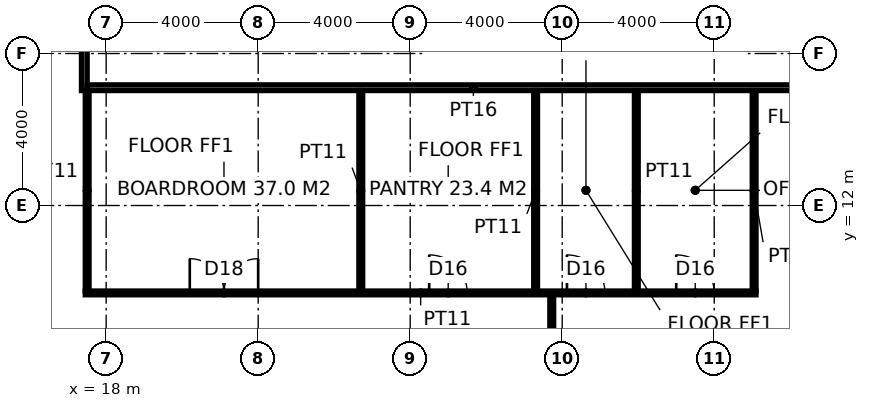
"""IFC4 building model, lengths in metres.
Left out: names, types, materials, properties, quantities, classifications, styles, units other than length and angle.
Written with IfcOpenShell. Run it as: python <this file> out.ifc"""

import sys

from ifc_helpers import new_model, si_unit, direction, frame, frame_2d, origin, place, context, subcontext, project, spatial, rectangle, extrude, element, fill, save


model = new_model("IFC4")
c1 = context("Model", 3, precision=1e-05, world=origin(), true_north=direction((0.0, 1.0)))
c2 = subcontext(c1, "Body", "Model", "MODEL_VIEW")
j1 = project(units=[si_unit("LENGTHUNIT", "METRE"), si_unit("PLANEANGLEUNIT", "RADIAN")], contexts=[c1])
p1 = place(None, origin())
s1 = spatial("IfcSite", under=j1, at=p1, CompositionType="ELEMENT")
p2 = place(p1, origin())
s2 = spatial("IfcBuilding", under=s1, at=p2, CompositionType="ELEMENT")
p3 = place(p2, frame((0.0, 0.0, 159.8)))
s3 = spatial("IfcBuildingStorey", under=s2, at=p3, CompositionType="ELEMENT", Elevation=159.8)
p4 = place(p3, frame((17.425, 15.025, 0.0), z_axis=(0.0, 0.0, 1.0), x_axis=(0.0, 1.0, 0.0)))
e1 = element("IfcWall", 1, at=p4, inside=s3, PredefinedType="PARTITIONING", context=c2, shape_type="SweptSolid", body=[
    extrude(rectangle(XDim=2.475, YDim=0.15, at=frame_2d((1.238, 0.0))), origin(), (0.0, 0.0, 1.0), 3.85),
])
p5 = place(p3, frame((17.5, 15.1, 0.0), z_axis=(0.0, 0.0, 1.0), x_axis=(1.0, 0.0, 0.0)))
e2 = element("IfcWall", 2, at=p5, inside=s3, PredefinedType="PARTITIONING", context=c2, shape_type="SweptSolid", body=[
    extrude(rectangle(XDim=20.325, YDim=0.15, at=frame_2d((10.163, 0.0))), origin(), (0.0, 0.0, 1.0), 3.85),
])
p6 = place(p3, frame((17.45, 9.7, 0.0), z_axis=(0.0, 0.0, 1.0), x_axis=(1.0, 0.0, 0.0)))
e3 = element("IfcWall", 3, at=p6, inside=s3, PredefinedType="PARTITIONING", context=c2, shape_type="SweptSolid", body=[
    extrude(rectangle(XDim=17.65, YDim=0.1, at=frame_2d((8.825, 0.0))), origin(), (0.0, 0.0, 1.0), 3.85),
])
p7 = place(p6, frame((2.75, 0.0, 0.0)))
e4 = element("IfcOpeningElement", 4, at=p7, cuts=e3, PredefinedType="OPENING", context=c2, shape_type="SweptSolid", body=[
    extrude(rectangle(XDim=1.8, YDim=2.4, at=frame_2d((0.9, 1.2))), frame((0.0, 0.06, 0.0), z_axis=(0.0, -1.0, 0.0), x_axis=(1.0, 0.0, 0.0)), (0.0, 0.0, 1.0), 0.12),
])
p8 = place(p6, frame((9.05, 0.0, 0.0)))
e5 = element("IfcOpeningElement", 5, at=p8, cuts=e3, PredefinedType="OPENING", context=c2, shape_type="SweptSolid", body=[
    extrude(rectangle(XDim=1.0, YDim=2.2, at=frame_2d((0.5, 1.1))), frame((0.0, 0.06, 0.0), z_axis=(0.0, -1.0, 0.0), x_axis=(1.0, 0.0, 0.0)), (0.0, 0.0, 1.0), 0.12),
])
p9 = place(p6, frame((12.675, 0.0, 0.0)))
e6 = element("IfcOpeningElement", 6, at=p9, cuts=e3, PredefinedType="OPENING", context=c2, shape_type="SweptSolid", body=[
    extrude(rectangle(XDim=1.0, YDim=2.2, at=frame_2d((0.5, 1.1))), frame((0.0, 0.06, 0.0), z_axis=(0.0, -1.0, 0.0), x_axis=(1.0, 0.0, 0.0)), (0.0, 0.0, 1.0), 0.12),
])
p10 = place(p6, frame((15.55, 0.0, 0.0)))
e7 = element("IfcOpeningElement", 7, at=p10, cuts=e3, PredefinedType="OPENING", context=c2, shape_type="SweptSolid", body=[
    extrude(rectangle(XDim=1.0, YDim=2.2, at=frame_2d((0.5, 1.1))), frame((0.0, 0.06, 0.0), z_axis=(0.0, -1.0, 0.0), x_axis=(1.0, 0.0, 0.0)), (0.0, 0.0, 1.0), 0.12),
])
for number, where, z_axis, x_axis in (
    (8, (17.5, 9.75, 0.0), (0.0, 0.0, 1.0), (0.0, 1.0, 0.0)),
    (9, (24.7, 9.75, 0.0), (0.0, 0.0, 1.0), (0.0, 1.0, 0.0)),
    (10, (29.3, 9.75, 0.0), (0.0, 0.0, 1.0), (0.0, 1.0, 0.0)),
    (11, (31.95, 9.75, 0.0), (0.0, 0.0, 1.0), (0.0, 1.0, 0.0)),
    (12, (35.05, 9.75, 0.0), (0.0, 0.0, 1.0), (0.0, 1.0, 0.0)),
):
    element("IfcWall", number, at=place(p3, frame(where, z_axis=z_axis, x_axis=x_axis)), inside=s3, PredefinedType="PARTITIONING", context=c2, shape_type="SweptSolid", body=[
        extrude(rectangle(XDim=5.275, YDim=0.1, at=frame_2d((2.637, 0.0))), origin(), (0.0, 0.0, 1.0), 3.85),
    ])
p11 = place(p3, frame((29.725, 9.65, 0.0), z_axis=(0.0, 0.0, 1.0), x_axis=(0.0, -1.0, 0.0)))
e13 = element("IfcWall", 13, at=p11, inside=s3, PredefinedType="PARTITIONING", context=c2, shape_type="SweptSolid", body=[
    extrude(rectangle(XDim=5.35, YDim=0.1, at=frame_2d((2.675, 0.0))), origin(), (0.0, 0.0, 1.0), 2.95),
])
p12 = place(p7, origin())
e14 = element("IfcDoor", 14, at=p12, inside=s3, OperationType="DOUBLE_DOOR_DOUBLE_SWING", PredefinedType="DOOR", context=c2, shape_type="SweptSolid", body=[
    extrude(rectangle(XDim=1.8, YDim=2.4, at=frame_2d((0.9, 1.2))), frame((0.0, 0.025, 0.0), z_axis=(0.0, -1.0, 0.0), x_axis=(1.0, 0.0, 0.0)), (0.0, 0.0, 1.0), 0.05),
])
fill(e4, e14)
p13 = place(p8, origin())
e15 = element("IfcDoor", 15, at=p13, inside=s3, OperationType="SINGLE_SWING_LEFT", PredefinedType="DOOR", context=c2, shape_type="SweptSolid", body=[
    extrude(rectangle(XDim=1.0, YDim=2.2, at=frame_2d((0.5, 1.1))), frame((0.0, 0.025, 0.0), z_axis=(0.0, -1.0, 0.0), x_axis=(1.0, 0.0, 0.0)), (0.0, 0.0, 1.0), 0.05),
])
fill(e5, e15)
p14 = place(p9, origin())
e16 = element("IfcDoor", 16, at=p14, inside=s3, OperationType="SINGLE_SWING_LEFT", PredefinedType="DOOR", context=c2, shape_type="SweptSolid", body=[
    extrude(rectangle(XDim=1.0, YDim=2.2, at=frame_2d((0.5, 1.1))), frame((0.0, 0.025, 0.0), z_axis=(0.0, -1.0, 0.0), x_axis=(1.0, 0.0, 0.0)), (0.0, 0.0, 1.0), 0.05),
])
fill(e6, e16)
p15 = place(p10, origin())
e17 = element("IfcDoor", 17, at=p15, inside=s3, OperationType="SINGLE_SWING_LEFT", PredefinedType="DOOR", context=c2, shape_type="SweptSolid", body=[
    extrude(rectangle(XDim=1.0, YDim=2.2, at=frame_2d((0.5, 1.1))), frame((0.0, 0.025, 0.0), z_axis=(0.0, -1.0, 0.0), x_axis=(1.0, 0.0, 0.0)), (0.0, 0.0, 1.0), 0.05),
])
fill(e7, e17)
save(model, sys.argv[1])
